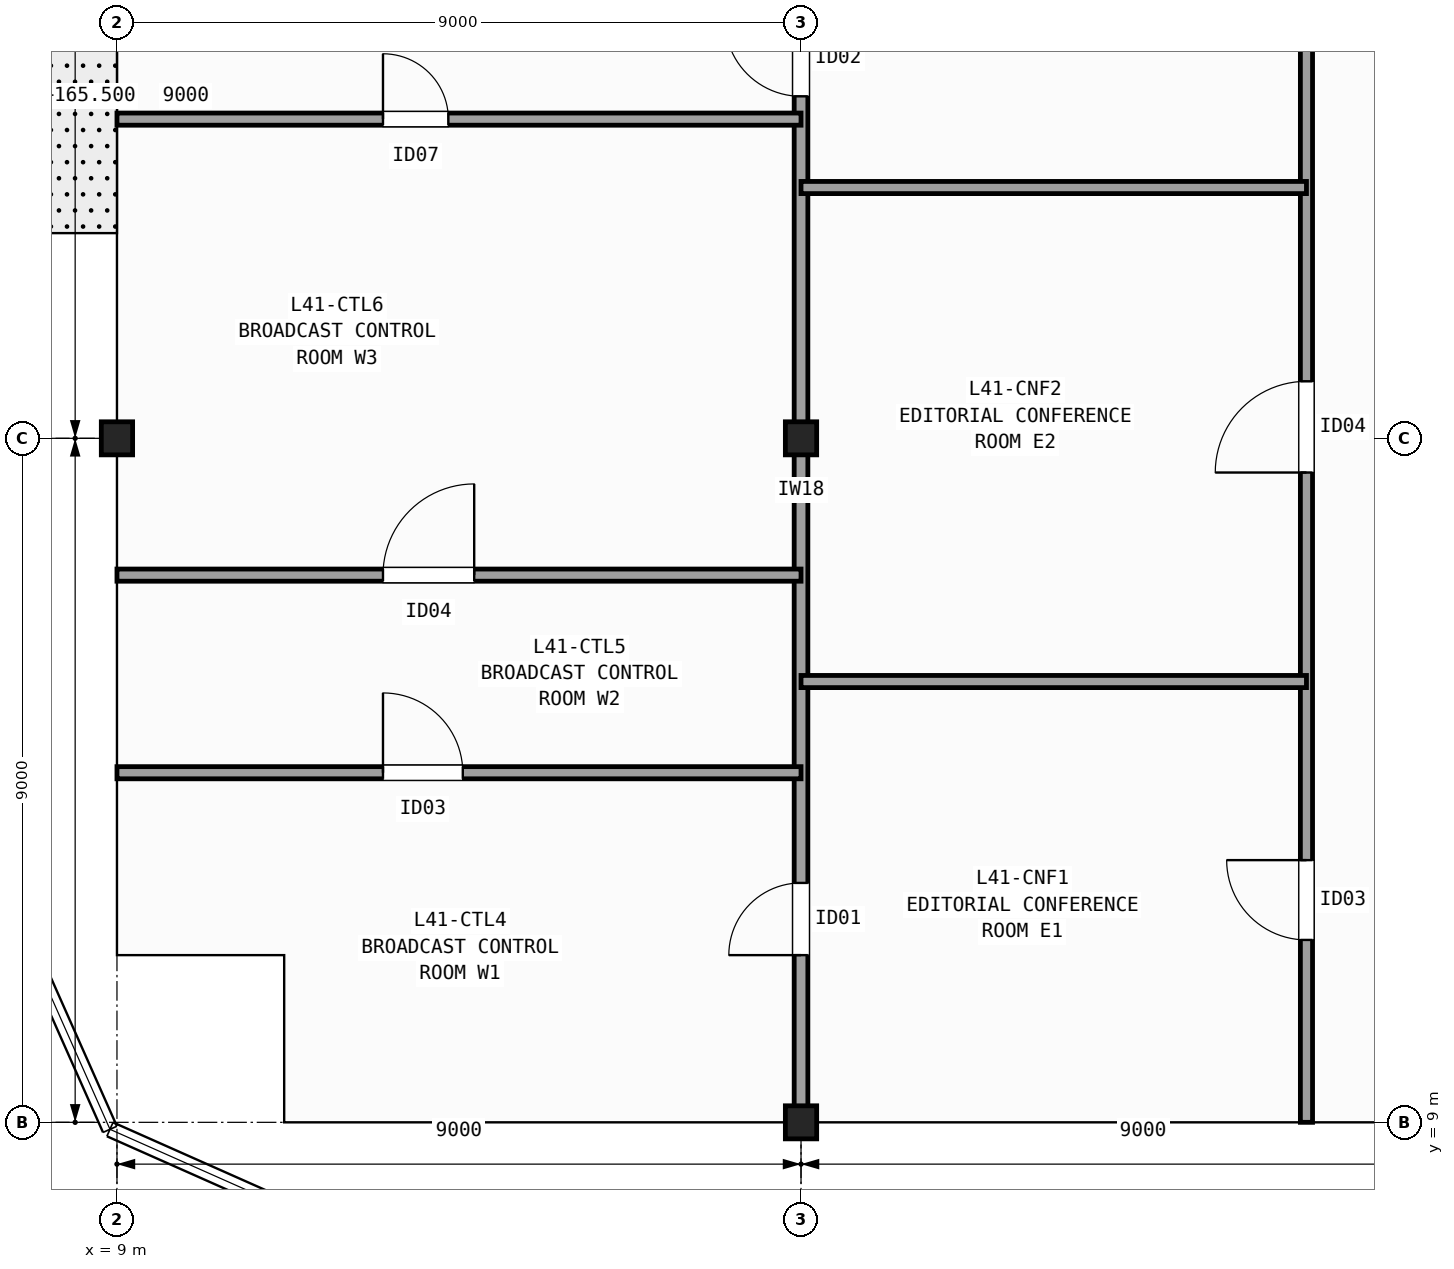
"""IFC4 building model, lengths in metres.
Left out: names, types, materials, properties, quantities, classifications, styles, units other than length and angle.
Written with IfcOpenShell. Run it as: python <this file> out.ifc"""

import sys

from ifc_helpers import new_model, si_unit, direction, frame, frame_2d, origin, origin_2d, place, context, subcontext, project, spatial, rectangle, i_section, extrude, element, fill, save


model = new_model("IFC4")
c1 = context("Model", 3, precision=1e-05, world=origin(), true_north=direction((0.0, 1.0)))
c2 = subcontext(c1, "Body", "Model", "MODEL_VIEW")
j1 = project(units=[si_unit("LENGTHUNIT", "METRE"), si_unit("PLANEANGLEUNIT", "RADIAN")], contexts=[c1])
p1 = place(None, origin())
s1 = spatial("IfcSite", under=j1, at=p1, CompositionType="ELEMENT")
p2 = place(p1, origin())
s2 = spatial("IfcBuilding", under=s1, at=p2, CompositionType="ELEMENT")
p3 = place(p2, frame((0.0, 0.0, 165.5)))
s3 = spatial("IfcBuildingStorey", under=s2, at=p3, CompositionType="ELEMENT", Elevation=165.5)
for number, where, z_axis, x_axis in (
    (1, (9.0, 18.0, 0.0), (0.0, 0.0, 1.0), (1.0, 0.0, 0.0)),
    (2, (18.0, 9.0, 0.0), (0.0, 0.0, 1.0), (1.0, 0.0, 0.0)),
    (3, (18.0, 18.0, 0.0), (0.0, 0.0, 1.0), (1.0, 0.0, 0.0)),
):
    element("IfcColumn", number, at=place(p3, frame(where, z_axis=z_axis, x_axis=x_axis)), inside=s3, PredefinedType="COLUMN", context=c2, shape_type="SweptSolid", body=[
        extrude(i_section(OverallWidth=0.412, OverallDepth=0.435, WebThickness=0.036, FlangeThickness=0.057, FilletRadius=0.015, at=origin_2d()), origin(), (0.0, 0.0, 1.0), 3.7),
    ])
p4 = place(p3, frame((24.65, 9.0, 0.0), z_axis=(0.0, 0.0, 1.0), x_axis=(0.0, 1.0, 0.0)))
e4 = element("IfcWall", 4, at=p4, inside=s3, PredefinedType="PARTITIONING", context=c2, shape_type="SweptSolid", body=[
    extrude(rectangle(XDim=19.2, YDim=0.16, at=frame_2d((9.6, 0.0))), origin(), (0.0, 0.0, 1.0), 2.584),
])
p5 = place(p4, frame((2.4, 0.0, 0.0)))
e5 = element("IfcOpeningElement", 5, at=p5, cuts=e4, PredefinedType="OPENING", context=c2, shape_type="SweptSolid", body=[
    extrude(rectangle(XDim=1.05, YDim=2.15, at=frame_2d((0.525, 1.075))), frame((0.0, 0.09, 0.0), z_axis=(0.0, -1.0, 0.0), x_axis=(1.0, 0.0, 0.0)), (0.0, 0.0, 1.0), 0.18),
])
p6 = place(p4, frame((8.55, 0.0, 0.0)))
e6 = element("IfcOpeningElement", 6, at=p6, cuts=e4, PredefinedType="OPENING", context=c2, shape_type="SweptSolid", body=[
    extrude(rectangle(XDim=1.2, YDim=2.15, at=frame_2d((0.6, 1.075))), frame((0.0, 0.09, 0.0), z_axis=(0.0, -1.0, 0.0), x_axis=(1.0, 0.0, 0.0)), (0.0, 0.0, 1.0), 0.18),
])
p7 = place(p4, frame((15.215, 0.0, 0.0)))
e7 = element("IfcOpeningElement", 7, at=p7, cuts=e4, PredefinedType="OPENING", context=c2, shape_type="SweptSolid", body=[
    extrude(rectangle(XDim=0.86, YDim=2.05, at=frame_2d((0.43, 1.025))), frame((0.0, 0.09, 0.0), z_axis=(0.0, -1.0, 0.0), x_axis=(1.0, 0.0, 0.0)), (0.0, 0.0, 1.0), 0.18),
])
p8 = place(p3, frame((18.0, 9.0, 0.0), z_axis=(0.0, 0.0, 1.0), x_axis=(0.0, 1.0, 0.0)))
e8 = element("IfcWall", 8, at=p8, inside=s3, PredefinedType="PARTITIONING", context=c2, shape_type="SweptSolid", body=[
    extrude(rectangle(XDim=19.13, YDim=0.18, at=frame_2d((9.565, 0.0))), origin(), (0.0, 0.0, 1.0), 2.584),
])
p9 = place(p8, frame((2.2, 0.0, 0.0)))
e9 = element("IfcOpeningElement", 9, at=p9, cuts=e8, PredefinedType="OPENING", context=c2, shape_type="SweptSolid", body=[
    extrude(rectangle(XDim=0.95, YDim=2.1, at=frame_2d((0.475, 1.05))), frame((0.0, 0.1, 0.0), z_axis=(0.0, -1.0, 0.0), x_axis=(1.0, 0.0, 0.0)), (0.0, 0.0, 1.0), 0.2),
])
p10 = place(p8, frame((13.5, 0.0, 0.0)))
e10 = element("IfcOpeningElement", 10, at=p10, cuts=e8, PredefinedType="OPENING", context=c2, shape_type="SweptSolid", body=[
    extrude(rectangle(XDim=1.0, YDim=2.1, at=frame_2d((0.5, 1.05))), frame((0.0, 0.1, 0.0), z_axis=(0.0, -1.0, 0.0), x_axis=(1.0, 0.0, 0.0)), (0.0, 0.0, 1.0), 0.2),
])
for number, where, z_axis, x_axis in (
    (11, (18.0, 14.8, 0.0), (0.0, 0.0, 1.0), (1.0, 0.0, 0.0)),
    (12, (18.0, 21.3, 0.0), (0.0, 0.0, 1.0), (1.0, 0.0, 0.0)),
):
    element("IfcWall", number, at=place(p3, frame(where, z_axis=z_axis, x_axis=x_axis)), inside=s3, PredefinedType="PARTITIONING", context=c2, shape_type="SweptSolid", body=[
        extrude(rectangle(XDim=6.65, YDim=0.16, at=frame_2d((3.325, 0.0))), origin(), (0.0, 0.0, 1.0), 2.742),
    ])
p11 = place(p3, frame((9.0, 13.6, 0.0), z_axis=(0.0, 0.0, 1.0), x_axis=(1.0, 0.0, 0.0)))
e13 = element("IfcWall", 13, at=p11, inside=s3, PredefinedType="PARTITIONING", context=c2, shape_type="SweptSolid", body=[
    extrude(rectangle(XDim=9.0, YDim=0.16, at=frame_2d((4.5, 0.0))), origin(), (0.0, 0.0, 1.0), 2.742),
])
p12 = place(p11, frame((3.5, 0.0, 0.0)))
e14 = element("IfcOpeningElement", 14, at=p12, cuts=e13, PredefinedType="OPENING", context=c2, shape_type="SweptSolid", body=[
    extrude(rectangle(XDim=1.05, YDim=2.15, at=frame_2d((0.525, 1.075))), frame((0.0, 0.09, 0.0), z_axis=(0.0, -1.0, 0.0), x_axis=(1.0, 0.0, 0.0)), (0.0, 0.0, 1.0), 0.18),
])
p13 = place(p3, frame((9.0, 16.2, 0.0), z_axis=(0.0, 0.0, 1.0), x_axis=(1.0, 0.0, 0.0)))
e15 = element("IfcWall", 15, at=p13, inside=s3, PredefinedType="PARTITIONING", context=c2, shape_type="SweptSolid", body=[
    extrude(rectangle(XDim=9.0, YDim=0.16, at=frame_2d((4.5, 0.0))), origin(), (0.0, 0.0, 1.0), 2.742),
])
p14 = place(p13, frame((3.5, 0.0, 0.0)))
e16 = element("IfcOpeningElement", 16, at=p14, cuts=e15, PredefinedType="OPENING", context=c2, shape_type="SweptSolid", body=[
    extrude(rectangle(XDim=1.2, YDim=2.15, at=frame_2d((0.6, 1.075))), frame((0.0, 0.09, 0.0), z_axis=(0.0, -1.0, 0.0), x_axis=(1.0, 0.0, 0.0)), (0.0, 0.0, 1.0), 0.18),
])
p15 = place(p3, frame((9.0, 22.2, 0.0), z_axis=(0.0, 0.0, 1.0), x_axis=(1.0, 0.0, 0.0)))
e17 = element("IfcWall", 17, at=p15, inside=s3, PredefinedType="PARTITIONING", context=c2, shape_type="SweptSolid", body=[
    extrude(rectangle(XDim=9.0, YDim=0.16, at=frame_2d((4.5, 0.0))), origin(), (0.0, 0.0, 1.0), 2.584),
])
p16 = place(p15, frame((3.5, 0.0, 0.0)))
e18 = element("IfcOpeningElement", 18, at=p16, cuts=e17, PredefinedType="OPENING", context=c2, shape_type="SweptSolid", body=[
    extrude(rectangle(XDim=0.86, YDim=2.05, at=frame_2d((0.43, 1.025))), frame((0.0, 0.09, 0.0), z_axis=(0.0, -1.0, 0.0), x_axis=(1.0, 0.0, 0.0)), (0.0, 0.0, 1.0), 0.18),
])
p17 = place(p5, origin())
e19 = element("IfcDoor", 19, at=p17, inside=s3, OperationType="SINGLE_SWING_RIGHT", PredefinedType="DOOR", context=c2, shape_type="SweptSolid", body=[
    extrude(rectangle(XDim=1.05, YDim=2.15, at=frame_2d((0.525, 1.075))), frame((0.0, 0.025, 0.0), z_axis=(0.0, -1.0, 0.0), x_axis=(1.0, 0.0, 0.0)), (0.0, 0.0, 1.0), 0.05),
])
fill(e5, e19)
p18 = place(p6, origin())
e20 = element("IfcDoor", 20, at=p18, inside=s3, OperationType="SINGLE_SWING_LEFT", PredefinedType="DOOR", context=c2, shape_type="SweptSolid", body=[
    extrude(rectangle(XDim=1.2, YDim=2.15, at=frame_2d((0.6, 1.075))), frame((0.0, 0.025, 0.0), z_axis=(0.0, -1.0, 0.0), x_axis=(1.0, 0.0, 0.0)), (0.0, 0.0, 1.0), 0.05),
])
fill(e6, e20)
p19 = place(p9, origin())
e21 = element("IfcDoor", 21, at=p19, inside=s3, OperationType="SINGLE_SWING_LEFT", PredefinedType="DOOR", context=c2, shape_type="SweptSolid", body=[
    extrude(rectangle(XDim=0.95, YDim=2.1, at=frame_2d((0.475, 1.05))), frame((0.0, 0.025, 0.0), z_axis=(0.0, -1.0, 0.0), x_axis=(1.0, 0.0, 0.0)), (0.0, 0.0, 1.0), 0.05),
])
fill(e9, e21)
p20 = place(p10, origin())
e22 = element("IfcDoor", 22, at=p20, inside=s3, OperationType="SINGLE_SWING_RIGHT", PredefinedType="DOOR", context=c2, shape_type="SweptSolid", body=[
    extrude(rectangle(XDim=1.0, YDim=2.1, at=frame_2d((0.5, 1.05))), frame((0.0, 0.025, 0.0), z_axis=(0.0, -1.0, 0.0), x_axis=(1.0, 0.0, 0.0)), (0.0, 0.0, 1.0), 0.05),
])
fill(e10, e22)
p21 = place(p12, origin())
e23 = element("IfcDoor", 23, at=p21, inside=s3, OperationType="SINGLE_SWING_LEFT", PredefinedType="DOOR", context=c2, shape_type="SweptSolid", body=[
    extrude(rectangle(XDim=1.05, YDim=2.15, at=frame_2d((0.525, 1.075))), frame((0.0, 0.025, 0.0), z_axis=(0.0, -1.0, 0.0), x_axis=(1.0, 0.0, 0.0)), (0.0, 0.0, 1.0), 0.05),
])
fill(e14, e23)
p22 = place(p14, origin())
e24 = element("IfcDoor", 24, at=p22, inside=s3, OperationType="SINGLE_SWING_RIGHT", PredefinedType="DOOR", context=c2, shape_type="SweptSolid", body=[
    extrude(rectangle(XDim=1.2, YDim=2.15, at=frame_2d((0.6, 1.075))), frame((0.0, 0.025, 0.0), z_axis=(0.0, -1.0, 0.0), x_axis=(1.0, 0.0, 0.0)), (0.0, 0.0, 1.0), 0.05),
])
fill(e16, e24)
p23 = place(p16, origin())
e25 = element("IfcDoor", 25, at=p23, inside=s3, OperationType="SINGLE_SWING_LEFT", PredefinedType="DOOR", context=c2, shape_type="SweptSolid", body=[
    extrude(rectangle(XDim=0.86, YDim=2.05, at=frame_2d((0.43, 1.025))), frame((0.0, 0.025, 0.0), z_axis=(0.0, -1.0, 0.0), x_axis=(1.0, 0.0, 0.0)), (0.0, 0.0, 1.0), 0.05),
])
fill(e18, e25)
save(model, sys.argv[1])
